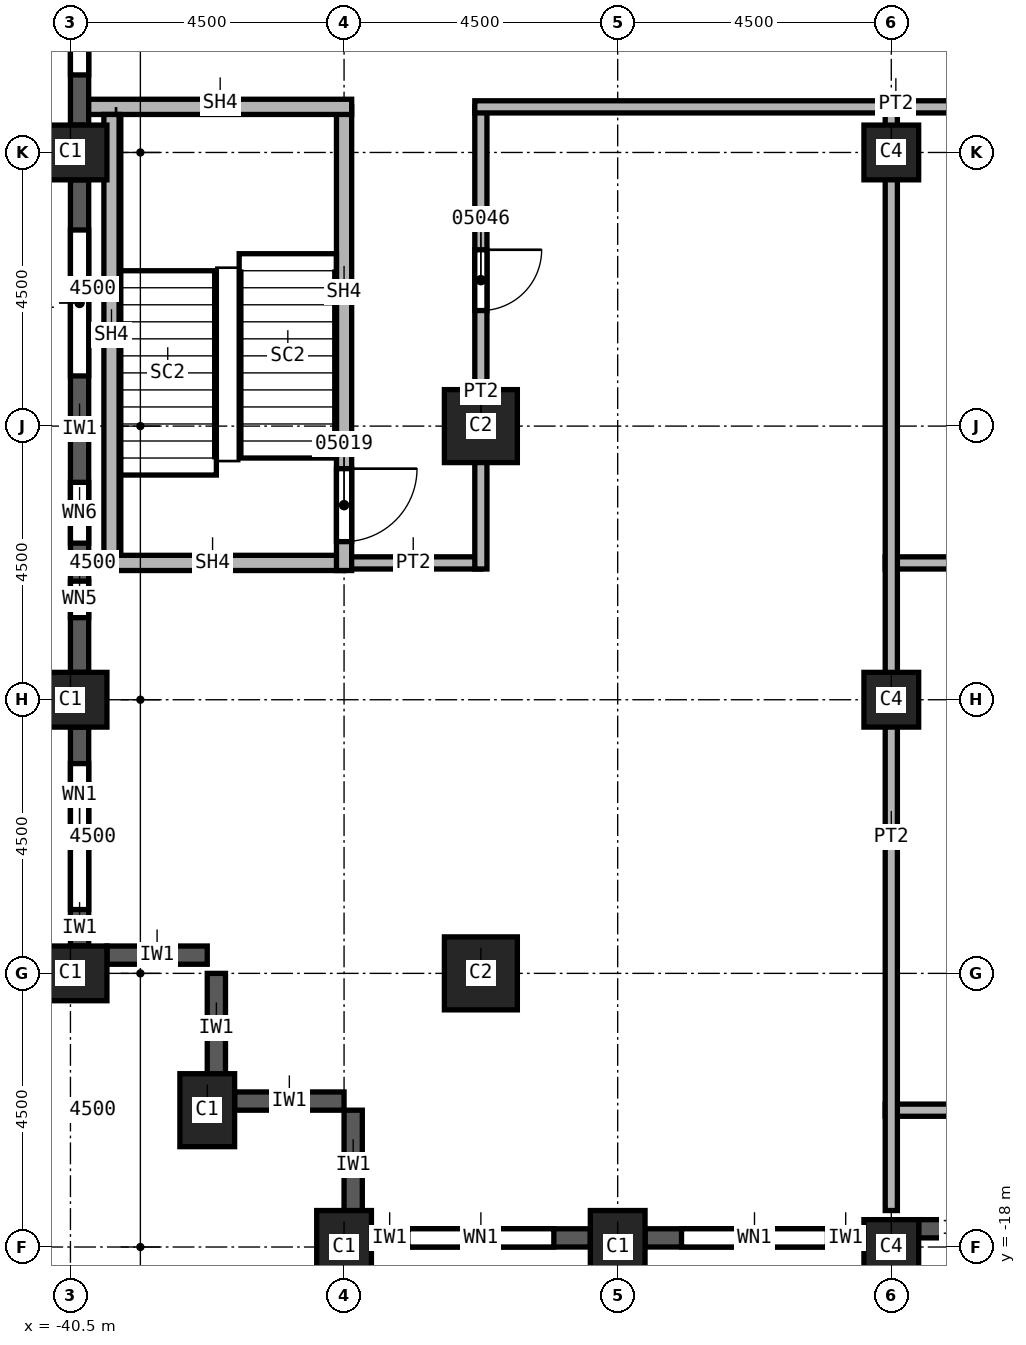
"""IFC4 building model, lengths in metres.
Left out: names, types, materials, properties, quantities, classifications, styles, units other than length and angle.
Written with IfcOpenShell. Run it as: python <this file> out.ifc"""

import sys

from ifc_helpers import new_model, si_unit, direction, frame, frame_2d, origin, origin_2d, place, context, subcontext, project, spatial, rectangle, extrude, element, fill, save


model = new_model("IFC4")
c1 = context("Model", 3, precision=1e-05, world=origin(), true_north=direction((0.0, 1.0)))
c2 = subcontext(c1, "Body", "Model", "MODEL_VIEW")
j1 = project(units=[si_unit("LENGTHUNIT", "METRE"), si_unit("PLANEANGLEUNIT", "RADIAN")], contexts=[c1])
p1 = place(None, origin())
s1 = spatial("IfcSite", under=j1, at=p1, CompositionType="ELEMENT")
p2 = place(p1, origin())
s2 = spatial("IfcBuilding", under=s1, at=p2, CompositionType="ELEMENT")
p3 = place(p2, frame((0.0, 0.0, 112.0)))
s3 = spatial("IfcBuildingStorey", under=s2, at=p3, CompositionType="ELEMENT", Elevation=112.0)
for number, where, z_axis, x_axis in (
    (1, (-40.5, 0.0, 0.0), (0.0, 0.0, 1.0), (0.0, 1.0, 0.0)),
    (2, (-40.5, -9.0, 0.0), (0.0, 0.0, 1.0), (0.0, 1.0, 0.0)),
    (3, (-40.5, -13.5, 0.0), (0.0, 0.0, 1.0), (0.0, 1.0, 0.0)),
    (4, (-38.25, -15.75, 0.0), (0.0, 0.0, 1.0), (1.0, 0.0, 0.0)),
    (5, (-31.5, -18.0, 0.0), (0.0, 0.0, 1.0), (1.0, 0.0, 0.0)),
    (6, (-36.0, -18.0, 0.0), (0.0, 0.0, 1.0), (1.0, 0.0, 0.0)),
):
    element("IfcColumn", number, at=place(p3, frame(where, z_axis=z_axis, x_axis=x_axis)), inside=s3, PredefinedType="COLUMN", context=c2, shape_type="SweptSolid", body=[
        extrude(rectangle(XDim=0.9, YDim=1.2, at=origin_2d()), origin(), (0.0, 0.0, 1.0), 3.7),
    ])
for number, where, z_axis, x_axis in (
    (7, (-33.75, -4.5, 0.0), (0.0, 0.0, 1.0), (1.0, 0.0, 0.0)),
    (8, (-33.75, -13.5, 0.0), (0.0, 0.0, 1.0), (1.0, 0.0, 0.0)),
):
    element("IfcColumn", number, at=place(p3, frame(where, z_axis=z_axis, x_axis=x_axis)), inside=s3, PredefinedType="COLUMN", context=c2, shape_type="SweptSolid", body=[
        extrude(rectangle(XDim=1.2, YDim=1.2, at=origin_2d()), origin(), (0.0, 0.0, 1.0), 3.7),
    ])
for number, where, z_axis, x_axis in (
    (9, (-27.0, 0.0, 0.0), (0.0, 0.0, 1.0), (1.0, 0.0, 0.0)),
    (10, (-27.0, -9.0, 0.0), (0.0, 0.0, 1.0), (1.0, 0.0, 0.0)),
    (11, (-27.0, -18.0, 0.0), (0.0, 0.0, 1.0), (1.0, 0.0, 0.0)),
):
    element("IfcColumn", number, at=place(p3, frame(where, z_axis=z_axis, x_axis=x_axis)), inside=s3, PredefinedType="COLUMN", context=c2, shape_type="SweptSolid", body=[
        extrude(rectangle(XDim=0.9, YDim=0.9, at=origin_2d()), origin(), (0.0, 0.0, 1.0), 3.7),
    ])
p4 = place(p3, frame((-39.9, -13.2, 0.0), z_axis=(0.0, 0.0, 1.0), x_axis=(1.0, 0.0, 0.0)))
e12 = element("IfcWall", 12, at=p4, inside=s3, PredefinedType="SOLIDWALL", context=c2, shape_type="SweptSolid", body=[
    extrude(rectangle(XDim=1.65, YDim=0.3, at=frame_2d((0.825, 0.0))), origin(), (0.0, 0.0, 1.0), 3.1),
])
for number, where, z_axis, x_axis in (
    (13, (-38.1, -15.3, 0.0), (0.0, 0.0, 1.0), (0.0, 1.0, 0.0)),
    (14, (-37.8, -15.6, 0.0), (0.0, 0.0, 1.0), (1.0, 0.0, 0.0)),
    (15, (-35.85, -17.55, 0.0), (0.0, 0.0, 1.0), (0.0, 1.0, 0.0)),
):
    element("IfcWall", number, at=place(p3, frame(where, z_axis=z_axis, x_axis=x_axis)), inside=s3, PredefinedType="SOLIDWALL", context=c2, shape_type="SweptSolid", body=[
        extrude(rectangle(XDim=1.8, YDim=0.3, at=frame_2d((0.9, 0.0))), origin(), (0.0, 0.0, 1.0), 3.1),
    ])
p5 = place(p3, frame((-40.35, 8.55, 0.0), z_axis=(0.0, 0.0, 1.0), x_axis=(0.0, -1.0, 0.0)))
e16 = element("IfcWall", 16, at=p5, inside=s3, PredefinedType="SOLIDWALL", context=c2, shape_type="SweptSolid", body=[
    extrude(rectangle(XDim=8.1, YDim=0.3, at=frame_2d((4.05, 0.0))), origin(), (0.0, 0.0, 1.0), 3.1),
])
p6 = place(p5, frame((0.825, 0.0, 0.8)))
e17 = element("IfcOpeningElement", 17, at=p6, cuts=e16, PredefinedType="OPENING", context=c2, shape_type="SweptSolid", body=[
    extrude(rectangle(XDim=2.4, YDim=1.95, at=frame_2d((1.2, 0.975))), frame((0.0, 0.15, 0.0), z_axis=(0.0, -1.0, 0.0), x_axis=(1.0, 0.0, 0.0)), (0.0, 0.0, 1.0), 0.3),
])
p7 = place(p5, frame((4.875, 0.0, 0.8)))
e18 = element("IfcOpeningElement", 18, at=p7, cuts=e16, PredefinedType="OPENING", context=c2, shape_type="SweptSolid", body=[
    extrude(rectangle(XDim=2.4, YDim=1.95, at=frame_2d((1.2, 0.975))), frame((0.0, 0.15, 0.0), z_axis=(0.0, -1.0, 0.0), x_axis=(1.0, 0.0, 0.0)), (0.0, 0.0, 1.0), 0.3),
])
p8 = place(p3, frame((-40.35, -0.45, 0.0), z_axis=(0.0, 0.0, 1.0), x_axis=(0.0, -1.0, 0.0)))
e19 = element("IfcWall", 19, at=p8, inside=s3, PredefinedType="SOLIDWALL", context=c2, shape_type="SweptSolid", body=[
    extrude(rectangle(XDim=8.1, YDim=0.3, at=frame_2d((4.05, 0.0))), origin(), (0.0, 0.0, 1.0), 3.1),
])
p9 = place(p8, frame((0.825, 0.0, 0.8)))
e20 = element("IfcOpeningElement", 20, at=p9, cuts=e19, PredefinedType="OPENING", context=c2, shape_type="SweptSolid", body=[
    extrude(rectangle(XDim=2.4, YDim=1.95, at=frame_2d((1.2, 0.975))), frame((0.0, 0.15, 0.0), z_axis=(0.0, -1.0, 0.0), x_axis=(1.0, 0.0, 0.0)), (0.0, 0.0, 1.0), 0.3),
])
p10 = place(p8, frame((4.975, 0.0, 0.8)))
e21 = element("IfcOpeningElement", 21, at=p10, cuts=e19, PredefinedType="OPENING", context=c2, shape_type="SweptSolid", body=[
    extrude(rectangle(XDim=1.0, YDim=1.95, at=frame_2d((0.5, 0.975))), frame((0.0, 0.15, 0.0), z_axis=(0.0, -1.0, 0.0), x_axis=(1.0, 0.0, 0.0)), (0.0, 0.0, 1.0), 0.3),
])
p11 = place(p8, frame((6.6, 0.0, 0.8)))
e22 = element("IfcOpeningElement", 22, at=p11, cuts=e19, PredefinedType="OPENING", context=c2, shape_type="SweptSolid", body=[
    extrude(rectangle(XDim=0.6, YDim=1.95, at=frame_2d((0.3, 0.975))), frame((0.0, 0.15, 0.0), z_axis=(0.0, -1.0, 0.0), x_axis=(1.0, 0.0, 0.0)), (0.0, 0.0, 1.0), 0.3),
])
p12 = place(p3, frame((-40.35, -9.45, 0.0), z_axis=(0.0, 0.0, 1.0), x_axis=(0.0, -1.0, 0.0)))
e23 = element("IfcWall", 23, at=p12, inside=s3, PredefinedType="SOLIDWALL", context=c2, shape_type="SweptSolid", body=[
    extrude(rectangle(XDim=3.6, YDim=0.3, at=frame_2d((1.8, 0.0))), origin(), (0.0, 0.0, 1.0), 3.1),
])
p13 = place(p12, frame((0.6, 0.0, 0.8)))
e24 = element("IfcOpeningElement", 24, at=p13, cuts=e23, PredefinedType="OPENING", context=c2, shape_type="SweptSolid", body=[
    extrude(rectangle(XDim=2.4, YDim=1.95, at=frame_2d((1.2, 0.975))), frame((0.0, 0.15, 0.0), z_axis=(0.0, -1.0, 0.0), x_axis=(1.0, 0.0, 0.0)), (0.0, 0.0, 1.0), 0.3),
])
p14 = place(p3, frame((-35.55, -17.85, 0.0), z_axis=(0.0, 0.0, 1.0), x_axis=(1.0, 0.0, 0.0)))
e25 = element("IfcWall", 25, at=p14, inside=s3, PredefinedType="SOLIDWALL", context=c2, shape_type="SweptSolid", body=[
    extrude(rectangle(XDim=3.6, YDim=0.3, at=frame_2d((1.8, 0.0))), origin(), (0.0, 0.0, 1.0), 3.1),
])
p15 = place(p14, frame((0.6, 0.0, 0.8)))
e26 = element("IfcOpeningElement", 26, at=p15, cuts=e25, PredefinedType="OPENING", context=c2, shape_type="SweptSolid", body=[
    extrude(rectangle(XDim=2.4, YDim=1.95, at=frame_2d((1.2, 0.975))), frame((0.0, 0.15, 0.0), z_axis=(0.0, -1.0, 0.0), x_axis=(1.0, 0.0, 0.0)), (0.0, 0.0, 1.0), 0.3),
])
p16 = place(p3, frame((-31.05, -17.85, 0.0), z_axis=(0.0, 0.0, 1.0), x_axis=(1.0, 0.0, 0.0)))
e27 = element("IfcWall", 27, at=p16, inside=s3, PredefinedType="SOLIDWALL", context=c2, shape_type="SweptSolid", body=[
    extrude(rectangle(XDim=3.6, YDim=0.3, at=frame_2d((1.8, 0.0))), origin(), (0.0, 0.0, 1.0), 3.1),
])
p17 = place(p16, frame((0.6, 0.0, 0.8)))
e28 = element("IfcOpeningElement", 28, at=p17, cuts=e27, PredefinedType="OPENING", context=c2, shape_type="SweptSolid", body=[
    extrude(rectangle(XDim=2.4, YDim=1.95, at=frame_2d((1.2, 0.975))), frame((0.0, 0.15, 0.0), z_axis=(0.0, -1.0, 0.0), x_axis=(1.0, 0.0, 0.0)), (0.0, 0.0, 1.0), 0.3),
])
p18 = place(p3, frame((-26.55, -17.7, 0.0), z_axis=(0.0, 0.0, 1.0), x_axis=(1.0, 0.0, 0.0)))
e29 = element("IfcWall", 29, at=p18, inside=s3, PredefinedType="SOLIDWALL", context=c2, shape_type="SweptSolid", body=[
    extrude(rectangle(XDim=1.35, YDim=0.3, at=frame_2d((0.675, 0.0))), origin(), (0.0, 0.0, 1.0), 3.1),
])
p19 = place(p3, frame((-33.75, -6.75, 0.0), z_axis=(0.0, 0.0, 1.0), x_axis=(-1.0, 0.0, 0.0)))
e30 = element("IfcWall", 30, at=p19, inside=s3, PredefinedType="PARTITIONING", context=c2, shape_type="SweptSolid", body=[
    extrude(rectangle(XDim=2.25, YDim=0.2, at=frame_2d((1.125, 0.0))), origin(), (0.0, 0.0, 1.0), 3.7),
])
p20 = place(p3, frame((-33.75, 0.75, 0.0), z_axis=(0.0, 0.0, 1.0), x_axis=(0.0, -1.0, 0.0)))
e31 = element("IfcWall", 31, at=p20, inside=s3, PredefinedType="PARTITIONING", context=c2, shape_type="SweptSolid", body=[
    extrude(rectangle(XDim=7.6, YDim=0.2, at=frame_2d((3.8, 0.0))), origin(), (0.0, 0.0, 1.0), 3.7),
])
p21 = place(p20, frame((2.35, 0.0, 0.0)))
e32 = element("IfcOpeningElement", 32, at=p21, cuts=e31, PredefinedType="OPENING", context=c2, shape_type="SweptSolid", body=[
    extrude(rectangle(XDim=1.0, YDim=2.1, at=frame_2d((0.5, 1.05))), frame((0.0, 0.1, 0.0), z_axis=(0.0, -1.0, 0.0), x_axis=(1.0, 0.0, 0.0)), (0.0, 0.0, 1.0), 0.2),
])
for number, where, z_axis, x_axis in (
    (33, (-27.1, -15.75, 0.0), (0.0, 0.0, 1.0), (1.0, 0.0, 0.0)),
    (34, (-27.1, -6.75, 0.0), (0.0, 0.0, 1.0), (1.0, 0.0, 0.0)),
):
    element("IfcWall", number, at=place(p3, frame(where, z_axis=z_axis, x_axis=x_axis)), inside=s3, PredefinedType="PARTITIONING", context=c2, shape_type="SweptSolid", body=[
        extrude(rectangle(XDim=7.2, YDim=0.2, at=frame_2d((3.6, 0.0))), origin(), (0.0, 0.0, 1.0), 3.7),
    ])
p22 = place(p3, frame((-27.0, -17.4, 0.0), z_axis=(0.0, 0.0, 1.0), x_axis=(0.0, 1.0, 0.0)))
e35 = element("IfcWall", 35, at=p22, inside=s3, PredefinedType="PARTITIONING", context=c2, shape_type="SweptSolid", body=[
    extrude(rectangle(XDim=18.15, YDim=0.2, at=frame_2d((9.075, 0.0))), origin(), (0.0, 0.0, 1.0), 3.7),
])
p23 = place(p3, frame((-19.9, 0.75, 0.0), z_axis=(0.0, 0.0, 1.0), x_axis=(-1.0, 0.0, 0.0)))
e36 = element("IfcWall", 36, at=p23, inside=s3, PredefinedType="PARTITIONING", context=c2, shape_type="SweptSolid", body=[
    extrude(rectangle(XDim=13.95, YDim=0.2, at=frame_2d((6.975, 0.0))), origin(), (0.0, 0.0, 1.0), 3.7),
])
p24 = place(p3, frame((-36.0, -6.75, 0.0), z_axis=(0.0, 0.0, 1.0), x_axis=(-1.0, 0.0, 0.0)))
e37 = element("IfcWall", 37, at=p24, inside=s3, PredefinedType="SOLIDWALL", context=c2, shape_type="SweptSolid", body=[
    extrude(rectangle(XDim=4.2, YDim=0.25, at=frame_2d((2.1, 0.0))), origin(), (0.0, 0.0, 1.0), 3.7),
])
p25 = place(p3, frame((-36.0, 0.75, 0.0), z_axis=(0.0, 0.0, 1.0), x_axis=(0.0, -1.0, 0.0)))
e38 = element("IfcWall", 38, at=p25, inside=s3, PredefinedType="SOLIDWALL", context=c2, shape_type="SweptSolid", body=[
    extrude(rectangle(XDim=7.625, YDim=0.25, at=frame_2d((3.812, 0.0))), origin(), (0.0, 0.0, 1.0), 3.7),
])
p26 = place(p25, frame((5.95, 0.0, 0.0)))
e39 = element("IfcOpeningElement", 39, at=p26, cuts=e38, PredefinedType="OPENING", context=c2, shape_type="SweptSolid", body=[
    extrude(rectangle(XDim=1.2, YDim=2.1, at=frame_2d((0.6, 1.05))), frame((0.0, 0.125, 0.0), z_axis=(0.0, -1.0, 0.0), x_axis=(1.0, 0.0, 0.0)), (0.0, 0.0, 1.0), 0.25),
])
p27 = place(p3, frame((-35.875, 0.75, 0.0), z_axis=(0.0, 0.0, 1.0), x_axis=(-1.0, 0.0, 0.0)))
e40 = element("IfcWall", 40, at=p27, inside=s3, PredefinedType="SOLIDWALL", context=c2, shape_type="SweptSolid", body=[
    extrude(rectangle(XDim=4.325, YDim=0.25, at=frame_2d((2.163, 0.0))), origin(), (0.0, 0.0, 1.0), 3.7),
])
p28 = place(p3, frame((-39.825, -6.625, 0.0), z_axis=(0.0, 0.0, 1.0), x_axis=(0.0, 1.0, 0.0)))
e41 = element("IfcWall", 41, at=p28, inside=s3, PredefinedType="SOLIDWALL", context=c2, shape_type="SweptSolid", body=[
    extrude(rectangle(XDim=7.25, YDim=0.25, at=frame_2d((3.625, 0.0))), origin(), (0.0, 0.0, 1.0), 3.7),
])
p29 = place(p7, origin())
e42 = element("IfcWindow", 42, at=p29, inside=s3, PartitioningType="SINGLE_PANEL", PredefinedType="WINDOW", context=c2, shape_type="SweptSolid", body=[
    extrude(rectangle(XDim=2.4, YDim=1.95, at=frame_2d((1.2, 0.975))), frame((0.0, 0.03, 0.0), z_axis=(0.0, -1.0, 0.0), x_axis=(1.0, 0.0, 0.0)), (0.0, 0.0, 1.0), 0.06),
])
fill(e18, e42)
p30 = place(p9, origin())
e43 = element("IfcWindow", 43, at=p30, inside=s3, PartitioningType="SINGLE_PANEL", PredefinedType="WINDOW", context=c2, shape_type="SweptSolid", body=[
    extrude(rectangle(XDim=2.4, YDim=1.95, at=frame_2d((1.2, 0.975))), frame((0.0, 0.03, 0.0), z_axis=(0.0, -1.0, 0.0), x_axis=(1.0, 0.0, 0.0)), (0.0, 0.0, 1.0), 0.06),
])
fill(e20, e43)
p31 = place(p13, origin())
e44 = element("IfcWindow", 44, at=p31, inside=s3, PartitioningType="SINGLE_PANEL", PredefinedType="WINDOW", context=c2, shape_type="SweptSolid", body=[
    extrude(rectangle(XDim=2.4, YDim=1.95, at=frame_2d((1.2, 0.975))), frame((0.0, 0.03, 0.0), z_axis=(0.0, -1.0, 0.0), x_axis=(1.0, 0.0, 0.0)), (0.0, 0.0, 1.0), 0.06),
])
fill(e24, e44)
p32 = place(p15, origin())
e45 = element("IfcWindow", 45, at=p32, inside=s3, PartitioningType="SINGLE_PANEL", PredefinedType="WINDOW", context=c2, shape_type="SweptSolid", body=[
    extrude(rectangle(XDim=2.4, YDim=1.95, at=frame_2d((1.2, 0.975))), frame((0.0, 0.03, 0.0), z_axis=(0.0, -1.0, 0.0), x_axis=(1.0, 0.0, 0.0)), (0.0, 0.0, 1.0), 0.06),
])
fill(e26, e45)
p33 = place(p17, origin())
e46 = element("IfcWindow", 46, at=p33, inside=s3, PartitioningType="SINGLE_PANEL", PredefinedType="WINDOW", context=c2, shape_type="SweptSolid", body=[
    extrude(rectangle(XDim=2.4, YDim=1.95, at=frame_2d((1.2, 0.975))), frame((0.0, 0.03, 0.0), z_axis=(0.0, -1.0, 0.0), x_axis=(1.0, 0.0, 0.0)), (0.0, 0.0, 1.0), 0.06),
])
fill(e28, e46)
p34 = place(p26, origin())
e47 = element("IfcDoor", 47, at=p34, inside=s3, OperationType="SINGLE_SWING_RIGHT", PredefinedType="DOOR", context=c2, shape_type="SweptSolid", body=[
    extrude(rectangle(XDim=1.2, YDim=2.1, at=frame_2d((0.6, 1.05))), frame((0.0, 0.025, 0.0), z_axis=(0.0, -1.0, 0.0), x_axis=(1.0, 0.0, 0.0)), (0.0, 0.0, 1.0), 0.05),
])
fill(e39, e47)
p35 = place(p21, origin())
e48 = element("IfcDoor", 48, at=p35, inside=s3, OperationType="SINGLE_SWING_LEFT", PredefinedType="DOOR", context=c2, shape_type="SweptSolid", body=[
    extrude(rectangle(XDim=1.0, YDim=2.1, at=frame_2d((0.5, 1.05))), frame((0.0, 0.025, 0.0), z_axis=(0.0, -1.0, 0.0), x_axis=(1.0, 0.0, 0.0)), (0.0, 0.0, 1.0), 0.05),
])
fill(e32, e48)
p36 = place(p10, origin())
e49 = element("IfcWindow", 49, at=p36, inside=s3, PartitioningType="SINGLE_PANEL", PredefinedType="WINDOW", context=c2, shape_type="SweptSolid", body=[
    extrude(rectangle(XDim=1.0, YDim=1.95, at=frame_2d((0.5, 0.975))), frame((0.0, 0.03, 0.0), z_axis=(0.0, -1.0, 0.0), x_axis=(1.0, 0.0, 0.0)), (0.0, 0.0, 1.0), 0.06),
])
fill(e21, e49)
p37 = place(p11, origin())
e50 = element("IfcWindow", 50, at=p37, inside=s3, PartitioningType="SINGLE_PANEL", PredefinedType="WINDOW", context=c2, shape_type="SweptSolid", body=[
    extrude(rectangle(XDim=0.6, YDim=1.95, at=frame_2d((0.3, 0.975))), frame((0.0, 0.03, 0.0), z_axis=(0.0, -1.0, 0.0), x_axis=(1.0, 0.0, 0.0)), (0.0, 0.0, 1.0), 0.06),
])
fill(e22, e50)
save(model, sys.argv[1])
